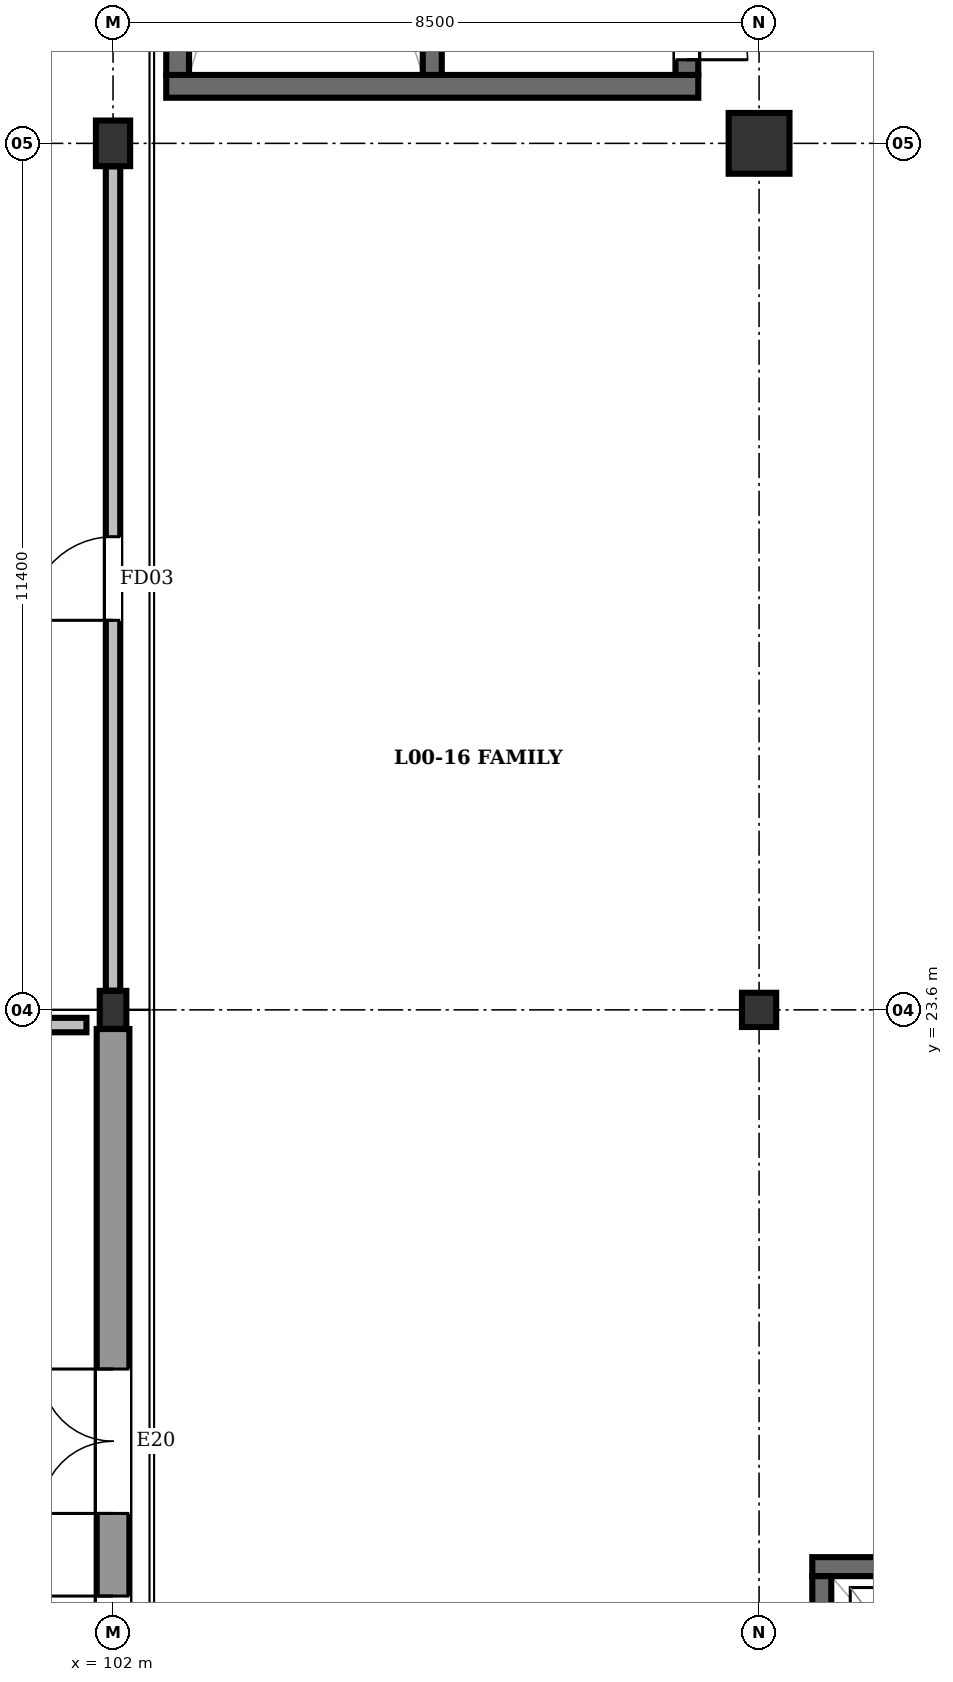
"""IFC4 building model, lengths in metres.
Left out: names, types, materials, properties, quantities, classifications, styles, units other than length and angle.
Written with IfcOpenShell. Run it as: python <this file> out.ifc"""

import sys

from ifc_helpers import new_model, si_unit, direction, frame, frame_2d, origin, origin_2d, place, context, subcontext, project, spatial, rectangle, circle, extrude, element, fill, save


model = new_model("IFC4")
c1 = context("Model", 3, precision=1e-05, world=origin(), true_north=direction((0.0, 1.0)))
c2 = subcontext(c1, "Body", "Model", "MODEL_VIEW")
j1 = project(units=[si_unit("LENGTHUNIT", "METRE"), si_unit("PLANEANGLEUNIT", "RADIAN")], contexts=[c1])
p1 = place(None, origin())
s1 = spatial("IfcSite", under=j1, at=p1, CompositionType="ELEMENT")
p2 = place(p1, origin())
s2 = spatial("IfcBuilding", under=s1, at=p2, CompositionType="ELEMENT")
p3 = place(p2, origin())
s3 = spatial("IfcBuildingStorey", under=s2, at=p3, CompositionType="ELEMENT", Elevation=0.0)
p4 = place(p3, frame((102.0, 23.6, 0.0), z_axis=(0.0, 0.0, 1.0), x_axis=(1.0, 0.0, 0.0)))
e1 = element("IfcColumn", 1, at=p4, inside=s3, PredefinedType="PILASTER", context=c2, shape_type="SweptSolid", body=[
    extrude(rectangle(XDim=0.35, YDim=0.5, at=origin_2d()), origin(), (0.0, 0.0, 1.0), 5.4),
])
p5 = place(p3, frame((102.0, 35.0, 0.0), z_axis=(0.0, 0.0, 1.0), x_axis=(1.0, 0.0, 0.0)))
e2 = element("IfcColumn", 2, at=p5, inside=s3, PredefinedType="PILASTER", context=c2, shape_type="SweptSolid", body=[
    extrude(rectangle(XDim=0.45, YDim=0.6, at=origin_2d()), origin(), (0.0, 0.0, 1.0), 5.4),
])
p6 = place(p3, frame((110.5, 23.6, 0.0), z_axis=(0.0, 0.0, 1.0), x_axis=(1.0, 0.0, 0.0)))
e3 = element("IfcColumn", 3, at=p6, inside=s3, PredefinedType="COLUMN", context=c2, shape_type="SweptSolid", body=[
    extrude(rectangle(XDim=0.45, YDim=0.45, at=origin_2d()), origin(), (0.0, 0.0, 1.0), 5.4),
])
p7 = place(p3, frame((110.5, 35.0, 0.0), z_axis=(0.0, 0.0, 1.0), x_axis=(1.0, 0.0, 0.0)))
e4 = element("IfcColumn", 4, at=p7, inside=s3, PredefinedType="COLUMN", context=c2, shape_type="SweptSolid", body=[
    extrude(circle(Radius=0.4, at=origin_2d()), origin(), (0.0, 0.0, 1.0), 5.4),
])
p8 = place(p3, frame((102.0, 12.502, 0.0), z_axis=(0.0, 0.0, 1.0), x_axis=(0.0, 1.0, 0.0)))
e5 = element("IfcWall", 5, at=p8, inside=s3, PredefinedType="STANDARD", context=c2, shape_type="SweptSolid", body=[
    extrude(rectangle(XDim=10.846, YDim=0.43, at=frame_2d((5.423, 0.0))), origin(), (0.0, 0.0, 1.0), 4.245),
])
p9 = place(p8, frame((1.386, 0.0, 0.0)))
e6 = element("IfcOpeningElement", 6, at=p9, cuts=e5, PredefinedType="OPENING", context=c2, shape_type="SweptSolid", body=[
    extrude(rectangle(XDim=2.0, YDim=2.35, at=frame_2d((1.0, 1.175))), frame((0.0, 0.227, 0.0), z_axis=(0.0, -1.0, 0.0), x_axis=(1.0, 0.0, 0.0)), (0.0, 0.0, 1.0), 0.454),
])
p10 = place(p8, frame((4.473, 0.0, 0.0)))
e7 = element("IfcOpeningElement", 7, at=p10, cuts=e5, PredefinedType="OPENING", context=c2, shape_type="SweptSolid", body=[
    extrude(rectangle(XDim=1.9, YDim=2.3, at=frame_2d((0.95, 1.15))), frame((0.0, 0.227, 0.0), z_axis=(0.0, -1.0, 0.0), x_axis=(1.0, 0.0, 0.0)), (0.0, 0.0, 1.0), 0.454),
])
p11 = place(p3, frame((102.7, 35.75, 0.0), z_axis=(0.0, 0.0, 1.0), x_axis=(1.0, 0.0, 0.0)))
e8 = element("IfcWall", 8, at=p11, inside=s3, PredefinedType="SHEAR", context=c2, shape_type="SweptSolid", body=[
    extrude(rectangle(XDim=7.0, YDim=0.3, at=frame_2d((3.5, 0.0))), origin(), (0.0, 0.0, 1.0), 5.16),
])
p12 = place(p3, frame((102.85, 35.9, 0.0), z_axis=(0.0, 0.0, 1.0), x_axis=(0.0, 1.0, 0.0)))
e9 = element("IfcWall", 9, at=p12, inside=s3, PredefinedType="SHEAR", context=c2, shape_type="SweptSolid", body=[
    extrude(rectangle(XDim=9.6, YDim=0.3, at=frame_2d((4.8, 0.0))), origin(), (0.0, 0.0, 1.0), 5.16),
])
p13 = place(p12, frame((3.6, 0.0, 0.0)))
e10 = element("IfcOpeningElement", 10, at=p13, cuts=e9, PredefinedType="OPENING", context=c2, shape_type="SweptSolid", body=[
    extrude(rectangle(XDim=1.1, YDim=2.2, at=frame_2d((0.55, 1.1))), frame((0.0, 0.162, 0.0), z_axis=(0.0, -1.0, 0.0), x_axis=(1.0, 0.0, 0.0)), (0.0, 0.0, 1.0), 0.324),
])
p14 = place(p3, frame((109.55, 35.9, 0.0), z_axis=(0.0, 0.0, 1.0), x_axis=(0.0, 1.0, 0.0)))
e11 = element("IfcWall", 11, at=p14, inside=s3, PredefinedType="SHEAR", context=c2, shape_type="SweptSolid", body=[
    extrude(rectangle(XDim=9.6, YDim=0.3, at=frame_2d((4.8, 0.0))), origin(), (0.0, 0.0, 1.0), 5.16),
])
p15 = place(p14, frame((0.2, 0.0, 0.0)))
e12 = element("IfcOpeningElement", 12, at=p15, cuts=e11, PredefinedType="OPENING", context=c2, shape_type="SweptSolid", body=[
    extrude(rectangle(XDim=1.6, YDim=2.2, at=frame_2d((0.8, 1.1))), frame((0.0, 0.162, 0.0), z_axis=(0.0, -1.0, 0.0), x_axis=(1.0, 0.0, 0.0)), (0.0, 0.0, 1.0), 0.324),
])
p16 = place(p3, frame((106.2, 35.9, 0.0), z_axis=(0.0, 0.0, 1.0), x_axis=(0.0, 1.0, 0.0)))
e13 = element("IfcWall", 13, at=p16, inside=s3, PredefinedType="SHEAR", context=c2, shape_type="SweptSolid", body=[
    extrude(rectangle(XDim=9.6, YDim=0.25, at=frame_2d((4.8, 0.0))), origin(), (0.0, 0.0, 1.0), 5.16),
])
p17 = place(p3, frame((111.2, 16.275, 0.0), z_axis=(0.0, 0.0, 1.0), x_axis=(1.0, 0.0, 0.0)))
e14 = element("IfcWall", 14, at=p17, inside=s3, PredefinedType="SHEAR", context=c2, shape_type="SweptSolid", body=[
    extrude(rectangle(XDim=2.8, YDim=0.25, at=frame_2d((1.4, 0.0))), origin(), (0.0, 0.0, 1.0), 5.16),
])
p18 = place(p3, frame((111.325, 13.45, 0.0), z_axis=(0.0, 0.0, 1.0), x_axis=(0.0, 1.0, 0.0)))
e15 = element("IfcWall", 15, at=p18, inside=s3, PredefinedType="SHEAR", context=c2, shape_type="SweptSolid", body=[
    extrude(rectangle(XDim=2.7, YDim=0.25, at=frame_2d((1.35, 0.0))), origin(), (0.0, 0.0, 1.0), 5.16),
])
p19 = place(p3, frame((96.35, 23.4, 0.0), z_axis=(0.0, 0.0, 1.0), x_axis=(1.0, 0.0, 0.0)))
e16 = element("IfcWall", 16, at=p19, inside=s3, PredefinedType="SOLIDWALL", context=c2, shape_type="SweptSolid", body=[
    extrude(rectangle(XDim=5.3, YDim=0.19, at=frame_2d((2.65, 0.0))), origin(), (0.0, 0.0, 1.0), 4.245),
])
p20 = place(p19, frame((2.175, 0.0, 0.0)))
e17 = element("IfcOpeningElement", 17, at=p20, cuts=e16, PredefinedType="OPENING", context=c2, shape_type="SweptSolid", body=[
    extrude(rectangle(XDim=0.95, YDim=2.15, at=frame_2d((0.475, 1.075))), frame((0.0, 0.107, 0.0), z_axis=(0.0, -1.0, 0.0), x_axis=(1.0, 0.0, 0.0)), (0.0, 0.0, 1.0), 0.214),
])
p21 = place(p3, frame((102.0, 23.852, 0.0), z_axis=(0.0, 0.0, 1.0), x_axis=(0.0, 1.0, 0.0)))
e18 = element("IfcWall", 18, at=p21, inside=s3, PredefinedType="SOLIDWALL", context=c2, shape_type="SweptSolid", body=[
    extrude(rectangle(XDim=10.846, YDim=0.19, at=frame_2d((5.423, 0.0))), origin(), (0.0, 0.0, 1.0), 4.245),
])
p22 = place(p21, frame((4.873, 0.0, 0.0)))
e19 = element("IfcOpeningElement", 19, at=p22, cuts=e18, PredefinedType="OPENING", context=c2, shape_type="SweptSolid", body=[
    extrude(rectangle(XDim=1.1, YDim=2.2, at=frame_2d((0.55, 1.1))), frame((0.0, 0.107, 0.0), z_axis=(0.0, -1.0, 0.0), x_axis=(1.0, 0.0, 0.0)), (0.0, 0.0, 1.0), 0.214),
])
p23 = place(p9, origin())
e20 = element("IfcDoor", 20, at=p23, inside=s3, OperationType="DOUBLE_DOOR_SINGLE_SWING", PredefinedType="DOOR", context=c2, shape_type="SweptSolid", body=[
    extrude(rectangle(XDim=2.0, YDim=2.35, at=frame_2d((1.0, 1.175))), frame((0.0, 0.025, 0.0), z_axis=(0.0, -1.0, 0.0), x_axis=(1.0, 0.0, 0.0)), (0.0, 0.0, 1.0), 0.05),
])
fill(e6, e20)
p24 = place(p10, origin())
e21 = element("IfcDoor", 21, at=p24, inside=s3, OperationType="DOUBLE_DOOR_SINGLE_SWING", PredefinedType="DOOR", context=c2, shape_type="SweptSolid", body=[
    extrude(rectangle(XDim=1.9, YDim=2.3, at=frame_2d((0.95, 1.15))), frame((0.0, 0.025, 0.0), z_axis=(0.0, -1.0, 0.0), x_axis=(1.0, 0.0, 0.0)), (0.0, 0.0, 1.0), 0.05),
])
fill(e7, e21)
p25 = place(p15, frame((1.6, 0.0, 0.0), z_axis=(0.0, 0.0, 1.0), x_axis=(-1.0, 0.0, 0.0)))
e22 = element("IfcDoor", 22, at=p25, inside=s3, OperationType="DOUBLE_DOOR_SINGLE_SWING", PredefinedType="DOOR", context=c2, shape_type="SweptSolid", body=[
    extrude(rectangle(XDim=1.6, YDim=2.2, at=frame_2d((0.8, 1.1))), frame((0.0, 0.025, 0.0), z_axis=(0.0, -1.0, 0.0), x_axis=(1.0, 0.0, 0.0)), (0.0, 0.0, 1.0), 0.05),
])
fill(e12, e22)
p26 = place(p22, origin())
e23 = element("IfcDoor", 23, at=p26, inside=s3, OperationType="SINGLE_SWING_LEFT", PredefinedType="DOOR", context=c2, shape_type="SweptSolid", body=[
    extrude(rectangle(XDim=1.1, YDim=2.2, at=frame_2d((0.55, 1.1))), frame((0.0, 0.025, 0.0), z_axis=(0.0, -1.0, 0.0), x_axis=(1.0, 0.0, 0.0)), (0.0, 0.0, 1.0), 0.05),
])
fill(e19, e23)
save(model, sys.argv[1])
